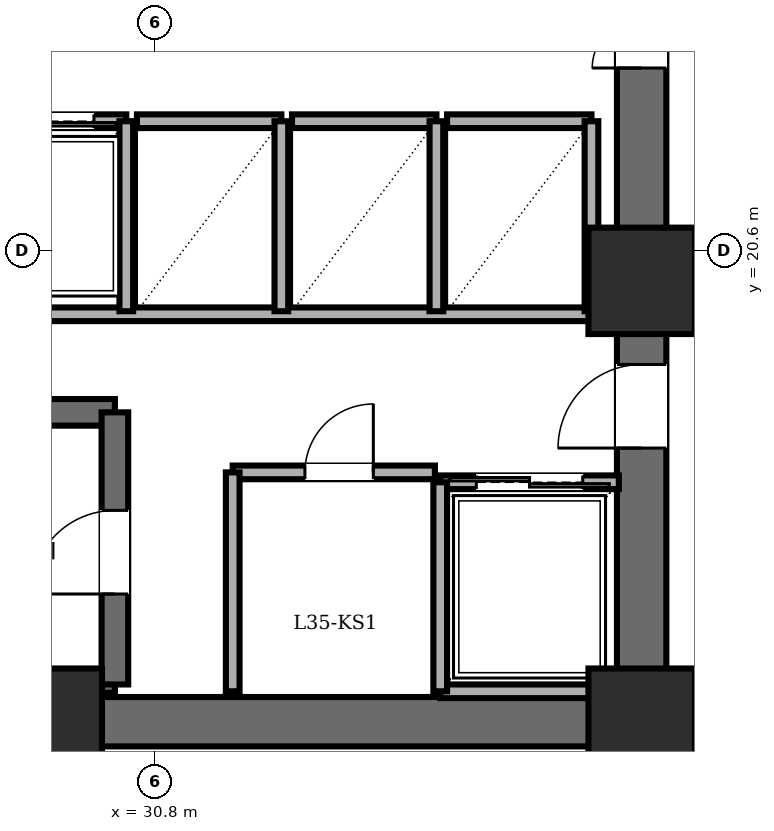
"""IFC4 building model, lengths in metres.
Left out: names, types, materials, properties, quantities, classifications, styles, units other than length and angle.
Written with IfcOpenShell. Run it as: python <this file> out.ifc"""

import sys

from ifc_helpers import new_model, si_unit, direction, frame, frame_2d, origin, origin_2d, place, context, subcontext, project, spatial, rectangle, extrude, element, fill, save


model = new_model("IFC4")
c1 = context("Model", 3, precision=1e-05, world=origin(), true_north=direction((0.0, 1.0)))
c2 = subcontext(c1, "Body", "Model", "MODEL_VIEW")
j1 = project(units=[si_unit("LENGTHUNIT", "METRE"), si_unit("PLANEANGLEUNIT", "RADIAN")], contexts=[c1])
p1 = place(None, origin())
s1 = spatial("IfcSite", under=j1, at=p1, CompositionType="ELEMENT")
p2 = place(p1, origin())
s2 = spatial("IfcBuilding", under=s1, at=p2, CompositionType="ELEMENT")
p3 = place(p2, frame((0.0, 0.0, 133.1)))
s3 = spatial("IfcBuildingStorey", under=s2, at=p3, CompositionType="ELEMENT", Elevation=133.1)
for number, where, z_axis, x_axis in (
    (1, (29.4, 14.4, 0.0), (0.0, 0.0, 1.0), (1.0, 0.0, 0.0)),
    (2, (37.2, 14.4, 0.0), (0.0, 0.0, 1.0), (1.0, 0.0, 0.0)),
    (3, (37.2, 20.2, 0.0), (0.0, 0.0, 1.0), (1.0, 0.0, 0.0)),
):
    element("IfcColumn", number, at=place(p3, frame(where, z_axis=z_axis, x_axis=x_axis)), inside=s3, PredefinedType="COLUMN", context=c2, shape_type="SweptSolid", body=[
        extrude(rectangle(XDim=1.4, YDim=1.4, at=origin_2d()), origin(), (0.0, 0.0, 1.0), 5.6),
    ])
p4 = place(p3, frame((37.2, 14.4, 0.0), z_axis=(0.0, 0.0, 1.0), x_axis=(-1.0, 0.0, 0.0)))
e4 = element("IfcWall", 4, at=p4, inside=s3, PredefinedType="SHEAR", context=c2, shape_type="SweptSolid", body=[
    extrude(rectangle(XDim=15.6, YDim=0.65, at=frame_2d((7.8, 0.0))), origin(), (0.0, 0.0, 1.0), 5.36),
])
p5 = place(p3, frame((37.2, 14.4, 0.0), z_axis=(0.0, 0.0, 1.0), x_axis=(0.0, 1.0, 0.0)))
e5 = element("IfcWall", 5, at=p5, inside=s3, PredefinedType="SHEAR", context=c2, shape_type="SweptSolid", body=[
    extrude(rectangle(XDim=19.2, YDim=0.65, at=frame_2d((9.6, 0.0))), origin(), (0.0, 0.0, 1.0), 5.36),
])
p6 = place(p5, frame((15.8, 0.0, 0.0)))
e6 = element("IfcOpeningElement", 6, at=p6, cuts=e5, PredefinedType="OPENING", context=c2, shape_type="SweptSolid", body=[
    extrude(rectangle(XDim=1.15, YDim=2.15, at=frame_2d((0.575, 1.075))), frame((0.0, 0.335, 0.0), z_axis=(0.0, -1.0, 0.0), x_axis=(1.0, 0.0, 0.0)), (0.0, 0.0, 1.0), 0.67),
])
p7 = place(p5, frame((3.6, 0.0, 0.0)))
e7 = element("IfcOpeningElement", 7, at=p7, cuts=e5, PredefinedType="OPENING", context=c2, shape_type="SweptSolid", body=[
    extrude(rectangle(XDim=1.1, YDim=2.15, at=frame_2d((0.55, 1.075))), frame((0.0, 0.335, 0.0), z_axis=(0.0, -1.0, 0.0), x_axis=(1.0, 0.0, 0.0)), (0.0, 0.0, 1.0), 0.67),
])
p8 = place(p5, frame((8.6, 0.0, 0.0)))
e8 = element("IfcOpeningElement", 8, at=p8, cuts=e5, PredefinedType="OPENING", context=c2, shape_type="SweptSolid", body=[
    extrude(rectangle(XDim=1.3, YDim=2.2, at=frame_2d((0.65, 1.1))), frame((0.0, 0.335, 0.0), z_axis=(0.0, -1.0, 0.0), x_axis=(1.0, 0.0, 0.0)), (0.0, 0.0, 1.0), 0.67),
])
p9 = place(p3, frame((22.48, 18.47, 0.0), z_axis=(0.0, 0.0, 1.0), x_axis=(1.0, 0.0, 0.0)))
e9 = element("IfcWall", 9, at=p9, inside=s3, PredefinedType="SOLIDWALL", context=c2, shape_type="SweptSolid", body=[
    extrude(rectangle(XDim=7.79, YDim=0.35, at=frame_2d((3.895, 0.0))), origin(), (0.0, 0.0, 1.0), 5.36),
])
p10 = place(p3, frame((22.48, 14.89, 0.0), z_axis=(0.0, 0.0, 1.0), x_axis=(1.0, 0.0, 0.0)))
e10 = element("IfcWall", 10, at=p10, inside=s3, PredefinedType="PARTITIONING", context=c2, shape_type="SweptSolid", body=[
    extrude(rectangle(XDim=7.79, YDim=0.22, at=frame_2d((3.895, 0.0))), origin(), (0.0, 0.0, 1.0), 5.36),
])
p11 = place(p3, frame((30.27, 14.89, 0.0), z_axis=(0.0, 0.0, 1.0), x_axis=(0.0, 1.0, 0.0)))
e11 = element("IfcWall", 11, at=p11, inside=s3, PredefinedType="SOLIDWALL", context=c2, shape_type="SweptSolid", body=[
    extrude(rectangle(XDim=3.58, YDim=0.35, at=frame_2d((1.79, 0.0))), origin(), (0.0, 0.0, 1.0), 5.36),
])
p12 = place(p11, frame((1.19, 0.0, 0.0)))
e12 = element("IfcOpeningElement", 12, at=p12, cuts=e11, PredefinedType="OPENING", context=c2, shape_type="SweptSolid", body=[
    extrude(rectangle(XDim=1.1, YDim=2.15, at=frame_2d((0.55, 1.075))), frame((0.0, 0.185, 0.0), z_axis=(0.0, -1.0, 0.0), x_axis=(1.0, 0.0, 0.0)), (0.0, 0.0, 1.0), 0.37),
])
p13 = place(p3, frame((21.95, 19.76, 0.0), z_axis=(0.0, 0.0, 1.0), x_axis=(1.0, 0.0, 0.0)))
e13 = element("IfcWall", 13, at=p13, inside=s3, PredefinedType="PARTITIONING", context=c2, shape_type="SweptSolid", body=[
    extrude(rectangle(XDim=14.87, YDim=0.18, at=frame_2d((7.435, 0.0))), origin(), (0.0, 0.0, 1.0), 5.36),
])
p14 = place(p3, frame((31.82, 17.68, 0.0), z_axis=(0.0, 0.0, 1.0), x_axis=(1.0, 0.0, 0.0)))
e14 = element("IfcWall", 14, at=p14, inside=s3, PredefinedType="PARTITIONING", context=c2, shape_type="SweptSolid", body=[
    extrude(rectangle(XDim=2.66, YDim=0.18, at=frame_2d((1.33, 0.0))), origin(), (0.0, 0.0, 1.0), 5.36),
])
p15 = place(p14, frame((0.95, 0.0, 0.0)))
e15 = element("IfcOpeningElement", 15, at=p15, cuts=e14, PredefinedType="OPENING", context=c2, shape_type="SweptSolid", body=[
    extrude(rectangle(XDim=0.9, YDim=2.05, at=frame_2d((0.45, 1.025))), frame((0.0, 0.1, 0.0), z_axis=(0.0, -1.0, 0.0), x_axis=(1.0, 0.0, 0.0)), (0.0, 0.0, 1.0), 0.2),
])
p16 = place(p3, frame((31.82, 14.8, 0.0), z_axis=(0.0, 0.0, 1.0), x_axis=(0.0, 1.0, 0.0)))
e16 = element("IfcWall", 16, at=p16, inside=s3, PredefinedType="PARTITIONING", context=c2, shape_type="SweptSolid", body=[
    extrude(rectangle(XDim=2.88, YDim=0.18, at=frame_2d((1.44, 0.0))), origin(), (0.0, 0.0, 1.0), 5.36),
])
p17 = place(p3, frame((34.55, 17.55, 0.0), z_axis=(0.0, 0.0, 1.0), x_axis=(1.0, 0.0, 0.0)))
e17 = element("IfcWall", 17, at=p17, inside=s3, PredefinedType="PARTITIONING", context=c2, shape_type="SweptSolid", body=[
    extrude(rectangle(XDim=2.35, YDim=0.18, at=frame_2d((1.175, 0.0))), origin(), (0.0, 0.0, 1.0), 5.36),
])
p18 = place(p17, frame((0.475, 0.0, 0.0)))
e18 = element("IfcOpeningElement", 18, at=p18, cuts=e17, PredefinedType="OPENING", context=c2, shape_type="SweptSolid", body=[
    extrude(rectangle(XDim=1.4, YDim=2.3, at=frame_2d((0.7, 1.15))), frame((0.0, 0.1, 0.0), z_axis=(0.0, -1.0, 0.0), x_axis=(1.0, 0.0, 0.0)), (0.0, 0.0, 1.0), 0.2),
])
p19 = place(p3, frame((36.9, 14.8, 0.0), z_axis=(0.0, 0.0, 1.0), x_axis=(-1.0, 0.0, 0.0)))
e19 = element("IfcWall", 19, at=p19, inside=s3, PredefinedType="PARTITIONING", context=c2, shape_type="SweptSolid", body=[
    extrude(rectangle(XDim=2.35, YDim=0.18, at=frame_2d((1.175, 0.0))), origin(), (0.0, 0.0, 1.0), 2.942),
])
p20 = place(p3, frame((34.55, 17.55, 0.0), z_axis=(0.0, 0.0, 1.0), x_axis=(0.0, -1.0, 0.0)))
e20 = element("IfcWall", 20, at=p20, inside=s3, PredefinedType="PARTITIONING", context=c2, shape_type="SweptSolid", body=[
    extrude(rectangle(XDim=2.75, YDim=0.18, at=frame_2d((1.375, 0.0))), origin(), (0.0, 0.0, 1.0), 5.36),
])
p21 = place(p3, frame((28.42, 22.3, 0.0), z_axis=(0.0, 0.0, 1.0), x_axis=(1.0, 0.0, 0.0)))
e21 = element("IfcWall", 21, at=p21, inside=s3, PredefinedType="PARTITIONING", context=c2, shape_type="SweptSolid", body=[
    extrude(rectangle(XDim=2.0, YDim=0.18, at=frame_2d((1.0, 0.0))), origin(), (0.0, 0.0, 1.0), 5.36),
])
p22 = place(p21, frame((0.425, 0.0, 0.0)))
e22 = element("IfcOpeningElement", 22, at=p22, cuts=e21, PredefinedType="OPENING", context=c2, shape_type="SweptSolid", body=[
    extrude(rectangle(XDim=1.15, YDim=2.2, at=frame_2d((0.575, 1.1))), frame((0.0, 0.1, 0.0), z_axis=(0.0, -1.0, 0.0), x_axis=(1.0, 0.0, 0.0)), (0.0, 0.0, 1.0), 0.2),
])
p23 = place(p3, frame((30.42, 19.8, 0.0), z_axis=(0.0, 0.0, 1.0), x_axis=(0.0, 1.0, 0.0)))
e23 = element("IfcWall", 23, at=p23, inside=s3, PredefinedType="PARTITIONING", context=c2, shape_type="SweptSolid", body=[
    extrude(rectangle(XDim=2.5, YDim=0.18, at=frame_2d((1.25, 0.0))), origin(), (0.0, 0.0, 1.0), 5.36),
])
p24 = place(p3, frame((30.56, 22.3, 0.0), z_axis=(0.0, 0.0, 1.0), x_axis=(1.0, 0.0, 0.0)))
e24 = element("IfcWall", 24, at=p24, inside=s3, PredefinedType="PARTITIONING", context=c2, shape_type="SweptSolid", body=[
    extrude(rectangle(XDim=1.9, YDim=0.18, at=frame_2d((0.95, 0.0))), origin(), (0.0, 0.0, 1.0), 5.36),
])
p25 = place(p3, frame((32.46, 19.8, 0.0), z_axis=(0.0, 0.0, 1.0), x_axis=(0.0, 1.0, 0.0)))
e25 = element("IfcWall", 25, at=p25, inside=s3, PredefinedType="PARTITIONING", context=c2, shape_type="SweptSolid", body=[
    extrude(rectangle(XDim=2.5, YDim=0.18, at=frame_2d((1.25, 0.0))), origin(), (0.0, 0.0, 1.0), 5.36),
])
p26 = place(p3, frame((32.6, 22.3, 0.0), z_axis=(0.0, 0.0, 1.0), x_axis=(1.0, 0.0, 0.0)))
e26 = element("IfcWall", 26, at=p26, inside=s3, PredefinedType="PARTITIONING", context=c2, shape_type="SweptSolid", body=[
    extrude(rectangle(XDim=1.9, YDim=0.18, at=frame_2d((0.95, 0.0))), origin(), (0.0, 0.0, 1.0), 5.36),
])
p27 = place(p3, frame((34.5, 19.8, 0.0), z_axis=(0.0, 0.0, 1.0), x_axis=(0.0, 1.0, 0.0)))
e27 = element("IfcWall", 27, at=p27, inside=s3, PredefinedType="PARTITIONING", context=c2, shape_type="SweptSolid", body=[
    extrude(rectangle(XDim=2.5, YDim=0.18, at=frame_2d((1.25, 0.0))), origin(), (0.0, 0.0, 1.0), 5.36),
])
p28 = place(p3, frame((34.64, 22.3, 0.0), z_axis=(0.0, 0.0, 1.0), x_axis=(1.0, 0.0, 0.0)))
e28 = element("IfcWall", 28, at=p28, inside=s3, PredefinedType="PARTITIONING", context=c2, shape_type="SweptSolid", body=[
    extrude(rectangle(XDim=1.9, YDim=0.18, at=frame_2d((0.95, 0.0))), origin(), (0.0, 0.0, 1.0), 5.36),
])
p29 = place(p3, frame((36.54, 19.8, 0.0), z_axis=(0.0, 0.0, 1.0), x_axis=(0.0, 1.0, 0.0)))
e29 = element("IfcWall", 29, at=p29, inside=s3, PredefinedType="PARTITIONING", context=c2, shape_type="SweptSolid", body=[
    extrude(rectangle(XDim=2.5, YDim=0.18, at=frame_2d((1.25, 0.0))), origin(), (0.0, 0.0, 1.0), 5.36),
])
p30 = place(p12, origin())
e30 = element("IfcDoor", 30, at=p30, inside=s3, OperationType="SINGLE_SWING_LEFT", PredefinedType="DOOR", context=c2, shape_type="SweptSolid", body=[
    extrude(rectangle(XDim=1.1, YDim=2.15, at=frame_2d((0.55, 1.075))), frame((0.0, 0.025, 0.0), z_axis=(0.0, -1.0, 0.0), x_axis=(1.0, 0.0, 0.0)), (0.0, 0.0, 1.0), 0.05),
])
fill(e12, e30)
p31 = place(p7, origin())
e31 = element("IfcDoor", 31, at=p31, inside=s3, OperationType="SINGLE_SWING_LEFT", PredefinedType="DOOR", context=c2, shape_type="SweptSolid", body=[
    extrude(rectangle(XDim=1.1, YDim=2.15, at=frame_2d((0.55, 1.075))), frame((0.0, 0.025, 0.0), z_axis=(0.0, -1.0, 0.0), x_axis=(1.0, 0.0, 0.0)), (0.0, 0.0, 1.0), 0.05),
])
fill(e7, e31)
p32 = place(p15, origin())
e32 = element("IfcDoor", 32, at=p32, inside=s3, OperationType="SINGLE_SWING_RIGHT", PredefinedType="DOOR", context=c2, shape_type="SweptSolid", body=[
    extrude(rectangle(XDim=0.9, YDim=2.05, at=frame_2d((0.45, 1.025))), frame((0.0, 0.025, 0.0), z_axis=(0.0, -1.0, 0.0), x_axis=(1.0, 0.0, 0.0)), (0.0, 0.0, 1.0), 0.05),
])
fill(e15, e32)
p33 = place(p18, origin())
e33 = element("IfcDoor", 33, at=p33, inside=s3, OperationType="DOUBLE_DOOR_SLIDING", PredefinedType="DOOR", context=c2, shape_type="SweptSolid", body=[
    extrude(rectangle(XDim=1.4, YDim=2.3, at=frame_2d((0.7, 1.15))), frame((0.0, 0.025, 0.0), z_axis=(0.0, -1.0, 0.0), x_axis=(1.0, 0.0, 0.0)), (0.0, 0.0, 1.0), 0.05),
])
fill(e18, e33)
p34 = place(p22, origin())
e34 = element("IfcDoor", 34, at=p34, inside=s3, OperationType="DOUBLE_DOOR_SLIDING", PredefinedType="DOOR", context=c2, shape_type="SweptSolid", body=[
    extrude(rectangle(XDim=1.15, YDim=2.2, at=frame_2d((0.575, 1.1))), frame((0.0, 0.025, 0.0), z_axis=(0.0, -1.0, 0.0), x_axis=(1.0, 0.0, 0.0)), (0.0, 0.0, 1.0), 0.05),
])
fill(e22, e34)
p35 = place(p8, origin())
e35 = element("IfcDoor", 35, at=p35, inside=s3, OperationType="DOUBLE_DOOR_SINGLE_SWING", PredefinedType="DOOR", context=c2, shape_type="SweptSolid", body=[
    extrude(rectangle(XDim=1.3, YDim=2.2, at=frame_2d((0.65, 1.1))), frame((0.0, 0.025, 0.0), z_axis=(0.0, -1.0, 0.0), x_axis=(1.0, 0.0, 0.0)), (0.0, 0.0, 1.0), 0.05),
])
fill(e8, e35)
save(model, sys.argv[1])
